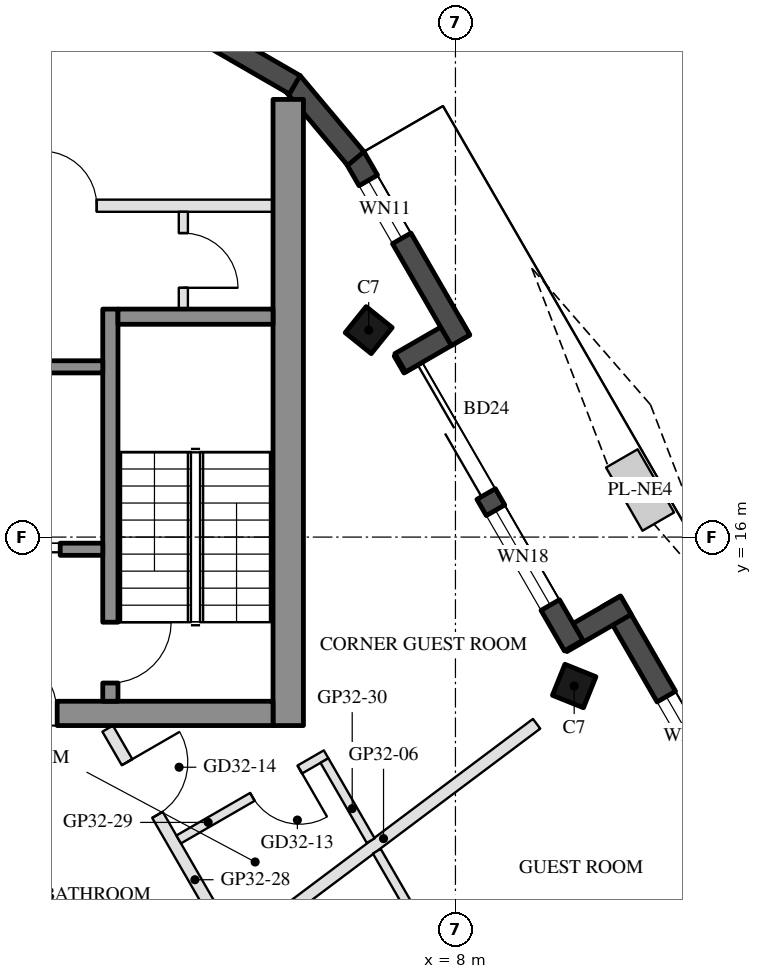
"""IFC4 building model, lengths in metres.
Left out: names, types, materials, properties, quantities, classifications, styles, units other than length and angle.
Written with IfcOpenShell. Run it as: python <this file> out.ifc"""

import sys

from ifc_helpers import new_model, si_unit, direction, frame, frame_2d, origin, origin_2d, place, context, subcontext, project, spatial, rectangle, hollow_rectangle, extrude, boolean, halfspace, element, fill, save


model = new_model("IFC4")
c1 = context("Model", 3, precision=1e-05, world=origin(), true_north=direction((0.0, 1.0)))
c2 = subcontext(c1, "Body", "Model", "MODEL_VIEW")
j1 = project(units=[si_unit("LENGTHUNIT", "METRE"), si_unit("PLANEANGLEUNIT", "RADIAN")], contexts=[c1])
p1 = place(None, origin())
s1 = spatial("IfcSite", under=j1, at=p1, CompositionType="ELEMENT")
p2 = place(p1, origin())
s2 = spatial("IfcBuilding", under=s1, at=p2, CompositionType="ELEMENT")
p3 = place(p2, frame((0.0, 0.0, 309.6)))
s3 = spatial("IfcBuildingStorey", under=s2, at=p3, CompositionType="ELEMENT", Elevation=309.6)
p4 = place(p3, frame((9.953, 13.551, 0.0), z_axis=(-0.100518860507, -0.128252691192, 0.98663428173), x_axis=(-0.503004973265, 0.862140661686, 0.060823320673)))
e1 = element("IfcColumn", 1, at=p4, inside=s3, PredefinedType="COLUMN", context=c2, shape_type="SweptSolid", body=[
    boolean("DIFFERENCE", boolean("DIFFERENCE", extrude(hollow_rectangle(XDim=0.55, YDim=0.55, WallThickness=0.025, at=origin_2d()), origin(), (0.0, 0.0, 1.0), 3.75), halfspace(frame((0.0, 0.0, 0.034), z_axis=(0.0, 0.0, 1.0), x_axis=(1.0, 0.0, 0.0)), True)), halfspace(frame((0.0, 0.0, 3.716), z_axis=(0.0, 0.0, 1.0), x_axis=(1.0, 0.0, 0.0)), False)),
])
p5 = place(p3, frame((6.573, 19.404, 0.0), z_axis=(-0.069728397733, -0.180050765176, 0.981182792608), x_axis=(-0.504276986778, 0.855013934028, 0.12106152661)))
e2 = element("IfcColumn", 2, at=p5, inside=s3, PredefinedType="COLUMN", context=c2, shape_type="SweptSolid", body=[
    boolean("DIFFERENCE", boolean("DIFFERENCE", extrude(hollow_rectangle(XDim=0.55, YDim=0.55, WallThickness=0.025, at=origin_2d()), origin(), (0.0, 0.0, 1.0), 3.771), halfspace(frame((0.0, 0.0, 0.04), z_axis=(0.0, 0.0, 1.0), x_axis=(1.0, 0.0, 0.0)), True)), halfspace(frame((0.0, 0.0, 3.731), z_axis=(0.0, 0.0, 1.0), x_axis=(1.0, 0.0, 0.0)), False)),
])
p6 = place(p3, frame((14.843, 7.531, 0.0), z_axis=(0.0, 0.0, 1.0), x_axis=(-0.500013816581, 0.866017426631, 0.0)))
e3 = element("IfcWall", 3, at=p6, inside=s3, PredefinedType="SOLIDWALL", context=c2, shape_type="SweptSolid", body=[
    extrude(rectangle(XDim=8.559, YDim=0.35, at=frame_2d((4.279, 0.0))), origin(), (0.0, 0.0, 1.0), 3.55),
])
p7 = place(p6, frame((3.15, 0.0, 0.0)))
e4 = element("IfcOpeningElement", 4, at=p7, cuts=e3, PredefinedType="OPENING", context=c2, shape_type="SweptSolid", body=[
    extrude(rectangle(XDim=1.8, YDim=2.4, at=frame_2d((0.9, 1.2))), frame((0.0, 0.185, 0.0), z_axis=(0.0, -1.0, 0.0), x_axis=(1.0, 0.0, 0.0)), (0.0, 0.0, 1.0), 0.37),
])
p8 = place(p6, frame((5.25, 0.0, 0.3)))
e5 = element("IfcOpeningElement", 5, at=p8, cuts=e3, PredefinedType="OPENING", context=c2, shape_type="SweptSolid", body=[
    extrude(rectangle(XDim=1.5, YDim=2.65, at=frame_2d((0.75, 1.325))), frame((0.0, 0.185, 0.0), z_axis=(0.0, -1.0, 0.0), x_axis=(1.0, 0.0, 0.0)), (0.0, 0.0, 1.0), 0.37),
])
p9 = place(p3, frame((10.802, 14.879, 0.0), z_axis=(0.0, 0.0, 1.0), x_axis=(-0.866005645448, -0.500034220881, 0.0)))
e6 = element("IfcWall", 6, at=p9, inside=s3, PredefinedType="SOLIDWALL", context=c2, shape_type="SweptSolid", body=[
    extrude(rectangle(XDim=1.22, YDim=0.35, at=frame_2d((0.61, 0.0))), origin(), (0.0, 0.0, 1.0), 3.55),
])
p10 = place(p3, frame((9.944, 14.216, 0.0), z_axis=(0.0, 0.0, 1.0), x_axis=(-0.500026936782, 0.866009851268, 0.0)))
e7 = element("IfcWall", 7, at=p10, inside=s3, PredefinedType="SOLIDWALL", context=c2, shape_type="SweptSolid", body=[
    extrude(rectangle(XDim=5.599, YDim=0.35, at=frame_2d((2.799, 0.0))), origin(), (0.0, 0.0, 1.0), 3.55),
])
p11 = place(p10, frame((2.879, 0.0, 0.0)))
e8 = element("IfcOpeningElement", 8, at=p11, cuts=e7, PredefinedType="OPENING", context=c2, shape_type="SweptSolid", body=[
    extrude(rectangle(XDim=2.4, YDim=2.4, at=frame_2d((1.2, 1.2))), frame((0.0, 0.185, 0.0), z_axis=(0.0, -1.0, 0.0), x_axis=(1.0, 0.0, 0.0)), (0.0, 0.0, 1.0), 0.37),
])
p12 = place(p10, frame((0.77, 0.0, 0.3)))
e9 = element("IfcOpeningElement", 9, at=p12, cuts=e7, PredefinedType="OPENING", context=c2, shape_type="SweptSolid", body=[
    extrude(rectangle(XDim=1.8, YDim=2.65, at=frame_2d((0.9, 1.325))), frame((0.0, 0.185, 0.0), z_axis=(0.0, -1.0, 0.0), x_axis=(1.0, 0.0, 0.0)), (0.0, 0.0, 1.0), 0.37),
])
p13 = place(p3, frame((7.092, 18.866, 0.0), z_axis=(0.0, 0.0, 1.0), x_axis=(0.866005645448, 0.500034220881, 0.0)))
e10 = element("IfcWall", 10, at=p13, inside=s3, PredefinedType="SOLIDWALL", context=c2, shape_type="SweptSolid", body=[
    extrude(rectangle(XDim=1.22, YDim=0.35, at=frame_2d((0.61, 0.0))), origin(), (0.0, 0.0, 1.0), 3.55),
])
p14 = place(p3, frame((8.084, 19.237, 0.0), z_axis=(0.0, 0.0, 1.0), x_axis=(-0.499949154193, 0.866054757635, 0.0)))
e11 = element("IfcWall", 11, at=p14, inside=s3, PredefinedType="SOLIDWALL", context=c2, shape_type="SweptSolid", body=[
    extrude(rectangle(XDim=3.48, YDim=0.35, at=frame_2d((1.74, 0.0))), origin(), (0.0, 0.0, 1.0), 3.55),
])
p15 = place(p14, frame((1.935, 0.0, 0.3)))
e12 = element("IfcOpeningElement", 12, at=p15, cuts=e11, PredefinedType="OPENING", context=c2, shape_type="SweptSolid", body=[
    extrude(rectangle(XDim=1.1, YDim=2.65, at=frame_2d((0.55, 1.325))), frame((0.0, 0.185, 0.0), z_axis=(0.0, -1.0, 0.0), x_axis=(1.0, 0.0, 0.0)), (0.0, 0.0, 1.0), 0.37),
])
p16 = place(p3, frame((6.361, 22.226, 0.0), z_axis=(0.0, 0.0, 1.0), x_axis=(-0.642782014883, 0.766049137682, 0.0)))
e13 = element("IfcWall", 13, at=p16, inside=s3, PredefinedType="SOLIDWALL", context=c2, shape_type="SweptSolid", body=[
    extrude(rectangle(XDim=1.634, YDim=0.35, at=frame_2d((0.817, 0.0))), origin(), (0.0, 0.0, 1.0), 3.55),
])
p17 = place(p3, frame((5.358, 23.439, 0.0), z_axis=(0.0, 0.0, 1.0), x_axis=(-0.866018903231, 0.500011259119, 0.0)))
e14 = element("IfcWall", 14, at=p17, inside=s3, PredefinedType="SOLIDWALL", context=c2, shape_type="SweptSolid", body=[
    extrude(rectangle(XDim=1.634, YDim=0.35, at=frame_2d((0.817, 0.0))), origin(), (0.0, 0.0, 1.0), 3.55),
])
p18 = place(p3, frame((5.25, 12.9, 0.0), z_axis=(0.0, 0.0, 1.0), x_axis=(0.0, 1.0, 0.0)))
e15 = element("IfcWall", 15, at=p18, inside=s3, PredefinedType="SHEAR", context=c2, shape_type="SweptSolid", body=[
    extrude(rectangle(XDim=10.299, YDim=0.5, at=frame_2d((5.149, 0.0))), origin(), (0.0, 0.0, 1.0), 3.5),
])
p19 = place(p3, frame((5.0, 13.1, 0.0), z_axis=(0.0, 0.0, 1.0), x_axis=(-1.0, 0.0, 0.0)))
e16 = element("IfcWall", 16, at=p19, inside=s3, PredefinedType="SHEAR", context=c2, shape_type="SweptSolid", body=[
    extrude(rectangle(XDim=10.0, YDim=0.4, at=frame_2d((5.0, 0.0))), origin(), (0.0, 0.0, 1.0), 3.5),
])
p20 = place(p19, frame((3.55, 0.0, 0.0)))
e17 = element("IfcOpeningElement", 17, at=p20, cuts=e16, PredefinedType="OPENING", context=c2, shape_type="SweptSolid", body=[
    extrude(rectangle(XDim=1.1, YDim=2.1, at=frame_2d((0.55, 1.05))), frame((0.0, 0.21, 0.0), z_axis=(0.0, -1.0, 0.0), x_axis=(1.0, 0.0, 0.0)), (0.0, 0.0, 1.0), 0.42),
])
p21 = place(p19, frame((5.85, 0.0, 0.0)))
e18 = element("IfcOpeningElement", 18, at=p21, cuts=e16, PredefinedType="OPENING", context=c2, shape_type="SweptSolid", body=[
    extrude(rectangle(XDim=1.4, YDim=2.1, at=frame_2d((0.7, 1.05))), frame((0.0, 0.21, 0.0), z_axis=(0.0, -1.0, 0.0), x_axis=(1.0, 0.0, 0.0)), (0.0, 0.0, 1.0), 0.42),
])
p22 = place(p3, frame((2.325, 13.3, 0.0), z_axis=(0.0, 0.0, 1.0), x_axis=(0.0, 1.0, 0.0)))
e19 = element("IfcWall", 19, at=p22, inside=s3, PredefinedType="SHEAR", context=c2, shape_type="SweptSolid", body=[
    extrude(rectangle(XDim=6.45, YDim=0.25, at=frame_2d((3.225, 0.0))), origin(), (0.0, 0.0, 1.0), 3.5),
])
p23 = place(p22, frame((0.3, 0.0, 0.0)))
e20 = element("IfcOpeningElement", 20, at=p23, cuts=e19, PredefinedType="OPENING", context=c2, shape_type="SweptSolid", body=[
    extrude(rectangle(XDim=1.0, YDim=2.1, at=frame_2d((0.5, 1.05))), frame((0.0, 0.135, 0.0), z_axis=(0.0, -1.0, 0.0), x_axis=(1.0, 0.0, 0.0)), (0.0, 0.0, 1.0), 0.27),
])
p24 = place(p3, frame((5.0, 19.625, 0.0), z_axis=(0.0, 0.0, 1.0), x_axis=(-1.0, 0.0, 0.0)))
e21 = element("IfcWall", 21, at=p24, inside=s3, PredefinedType="SHEAR", context=c2, shape_type="SweptSolid", body=[
    extrude(rectangle(XDim=2.55, YDim=0.25, at=frame_2d((1.275, 0.0))), origin(), (0.0, 0.0, 1.0), 3.5),
])
p25 = place(p3, frame((2.2, 18.8, 0.0), z_axis=(0.0, 0.0, 1.0), x_axis=(-1.0, 0.0, 0.0)))
e22 = element("IfcWall", 22, at=p25, inside=s3, PredefinedType="SHEAR", context=c2, shape_type="SweptSolid", body=[
    extrude(rectangle(XDim=2.8, YDim=0.2, at=frame_2d((1.4, 0.0))), origin(), (0.0, 0.0, 1.0), 3.5),
])
p26 = place(p3, frame((2.2, 15.8, 0.0), z_axis=(0.0, 0.0, 1.0), x_axis=(-1.0, 0.0, 0.0)))
e23 = element("IfcWall", 23, at=p26, inside=s3, PredefinedType="SHEAR", context=c2, shape_type="SweptSolid", body=[
    extrude(rectangle(XDim=2.8, YDim=0.2, at=frame_2d((1.4, 0.0))), origin(), (0.0, 0.0, 1.0), 3.5),
])
p27 = place(p26, frame((0.7, 0.0, 0.0)))
e24 = element("IfcOpeningElement", 24, at=p27, cuts=e23, PredefinedType="OPENING", context=c2, shape_type="SweptSolid", body=[
    extrude(rectangle(XDim=1.2, YDim=2.1, at=frame_2d((0.6, 1.05))), frame((0.0, 0.11, 0.0), z_axis=(0.0, -1.0, 0.0), x_axis=(1.0, 0.0, 0.0)), (0.0, 0.0, 1.0), 0.22),
])
p28 = place(p3, frame((5.0, 21.45, 0.0), z_axis=(0.0, 0.0, 1.0), x_axis=(-1.0, 0.0, 0.0)))
e25 = element("IfcWall", 25, at=p28, inside=s3, PredefinedType="PARTITIONING", context=c2, shape_type="SweptSolid", body=[
    extrude(rectangle(XDim=5.4, YDim=0.2, at=frame_2d((2.7, 0.0))), origin(), (0.0, 0.0, 1.0), 3.5),
])
p29 = place(p28, frame((2.9, 0.0, 0.0)))
e26 = element("IfcOpeningElement", 26, at=p29, cuts=e25, PredefinedType="OPENING", context=c2, shape_type="SweptSolid", body=[
    extrude(rectangle(XDim=0.9, YDim=2.1, at=frame_2d((0.45, 1.05))), frame((0.0, 0.11, 0.0), z_axis=(0.0, -1.0, 0.0), x_axis=(1.0, 0.0, 0.0)), (0.0, 0.0, 1.0), 0.22),
])
p30 = place(p3, frame((3.525, 19.75, 0.0), z_axis=(0.0, 0.0, 1.0), x_axis=(0.0, 1.0, 0.0)))
e27 = element("IfcWall", 27, at=p30, inside=s3, PredefinedType="PARTITIONING", context=c2, shape_type="SweptSolid", body=[
    extrude(rectangle(XDim=1.6, YDim=0.15, at=frame_2d((0.8, 0.0))), origin(), (0.0, 0.0, 1.0), 3.5),
])
p31 = place(p30, frame((0.35, 0.0, 0.0)))
e28 = element("IfcOpeningElement", 28, at=p31, cuts=e27, PredefinedType="OPENING", context=c2, shape_type="SweptSolid", body=[
    extrude(rectangle(XDim=0.9, YDim=2.1, at=frame_2d((0.45, 1.05))), frame((0.0, 0.085, 0.0), z_axis=(0.0, -1.0, 0.0), x_axis=(1.0, 0.0, 0.0)), (0.0, 0.0, 1.0), 0.17),
])
p32 = place(p3, frame((9.334, 12.93, 0.0), z_axis=(0.0, 0.0, 1.0), x_axis=(-0.799864994536, -0.600179965107, 0.0)))
e29 = element("IfcWall", 29, at=p32, inside=s3, PredefinedType="PARTITIONING", context=c2, shape_type="SweptSolid", body=[
    extrude(rectangle(XDim=6.294, YDim=0.2, at=frame_2d((3.147, 0.0))), origin(), (0.0, 0.0, 1.0), 3.1),
])
p33 = place(p3, frame((7.79, 8.957, 0.0), z_axis=(0.0, 0.0, 1.0), x_axis=(-0.500018419339, 0.866014769113, 0.0)))
e30 = element("IfcWall", 30, at=p33, inside=s3, PredefinedType="PARTITIONING", context=c2, shape_type="SweptSolid", body=[
    extrude(rectangle(XDim=2.166, YDim=0.15, at=frame_2d((1.083, 0.0))), origin(), (0.0, 0.0, 1.0), 3.55),
])
p34 = place(p3, frame((2.281, 12.85, 0.0), z_axis=(0.0, 0.0, 1.0), x_axis=(0.500007699544, -0.866020958405, 0.0)))
e31 = element("IfcWall", 31, at=p34, inside=s3, PredefinedType="PARTITIONING", context=c2, shape_type="SweptSolid", body=[
    extrude(rectangle(XDim=4.1, YDim=0.2, at=frame_2d((2.05, 0.0))), origin(), (0.0, 0.0, 1.0), 3.1),
])
p35 = place(p34, frame((0.637, 0.0, 0.0)))
e32 = element("IfcOpeningElement", 32, at=p35, cuts=e31, PredefinedType="OPENING", context=c2, shape_type="SweptSolid", body=[
    extrude(rectangle(XDim=1.0, YDim=2.1, at=frame_2d((0.5, 1.05))), frame((0.0, 0.11, 0.0), z_axis=(0.0, -1.0, 0.0), x_axis=(1.0, 0.0, 0.0)), (0.0, 0.0, 1.0), 0.22),
])
p36 = place(p3, frame((5.873, 12.427, 0.0), z_axis=(0.0, 0.0, 1.0), x_axis=(-0.866034573852, -0.49998411664, 0.0)))
e33 = element("IfcWall", 33, at=p36, inside=s3, PredefinedType="PARTITIONING", context=c2, shape_type="SweptSolid", body=[
    extrude(rectangle(XDim=2.8, YDim=0.15, at=frame_2d((1.4, 0.0))), origin(), (0.0, 0.0, 1.0), 3.55),
])
p37 = place(p36, frame((0.5, 0.0, 0.0)))
e34 = element("IfcOpeningElement", 34, at=p37, cuts=e33, PredefinedType="OPENING", context=c2, shape_type="SweptSolid", body=[
    extrude(rectangle(XDim=0.9, YDim=2.1, at=frame_2d((0.45, 1.05))), frame((0.0, 0.085, 0.0), z_axis=(0.0, -1.0, 0.0), x_axis=(1.0, 0.0, 0.0)), (0.0, 0.0, 1.0), 0.17),
])
p38 = place(p3, frame((6.606, 11.008, 0.0), z_axis=(0.0, 0.0, 1.0), x_axis=(-0.500023511883, 0.866011828767, 0.0)))
e35 = element("IfcWall", 35, at=p38, inside=s3, PredefinedType="PARTITIONING", context=c2, shape_type="SweptSolid", body=[
    extrude(rectangle(XDim=1.521, YDim=0.15, at=frame_2d((0.76, 0.0))), origin(), (0.0, 0.0, 1.0), 3.1),
])
p39 = place(p8, origin())
e36 = element("IfcWindow", 36, at=p39, inside=s3, PartitioningType="SINGLE_PANEL", PredefinedType="WINDOW", context=c2, shape_type="SweptSolid", body=[
    extrude(rectangle(XDim=1.5, YDim=2.65, at=frame_2d((0.75, 1.325))), frame((0.0, 0.03, 0.0), z_axis=(0.0, -1.0, 0.0), x_axis=(1.0, 0.0, 0.0)), (0.0, 0.0, 1.0), 0.06),
])
fill(e5, e36)
p40 = place(p11, frame((2.4, 0.0, 0.0), z_axis=(0.0, 0.0, 1.0), x_axis=(-1.0, 0.0, 0.0)))
e37 = element("IfcDoor", 37, at=p40, inside=s3, OperationType="SLIDING_TO_LEFT", PredefinedType="DOOR", context=c2, shape_type="SweptSolid", body=[
    extrude(rectangle(XDim=2.4, YDim=2.4, at=frame_2d((1.2, 1.2))), frame((0.0, 0.025, 0.0), z_axis=(0.0, -1.0, 0.0), x_axis=(1.0, 0.0, 0.0)), (0.0, 0.0, 1.0), 0.05),
])
fill(e8, e37)
p41 = place(p12, origin())
e38 = element("IfcWindow", 38, at=p41, inside=s3, PartitioningType="SINGLE_PANEL", PredefinedType="WINDOW", context=c2, shape_type="SweptSolid", body=[
    extrude(rectangle(XDim=1.8, YDim=2.65, at=frame_2d((0.9, 1.325))), frame((0.0, 0.03, 0.0), z_axis=(0.0, -1.0, 0.0), x_axis=(1.0, 0.0, 0.0)), (0.0, 0.0, 1.0), 0.06),
])
fill(e9, e38)
p42 = place(p15, origin())
e39 = element("IfcWindow", 39, at=p42, inside=s3, PartitioningType="SINGLE_PANEL", PredefinedType="WINDOW", context=c2, shape_type="SweptSolid", body=[
    extrude(rectangle(XDim=1.1, YDim=2.65, at=frame_2d((0.55, 1.325))), frame((0.0, 0.03, 0.0), z_axis=(0.0, -1.0, 0.0), x_axis=(1.0, 0.0, 0.0)), (0.0, 0.0, 1.0), 0.06),
])
fill(e12, e39)
p43 = place(p27, origin())
e40 = element("IfcDoor", 40, at=p43, inside=s3, OperationType="DOUBLE_DOOR_SLIDING", PredefinedType="DOOR", context=c2, shape_type="SweptSolid", body=[
    extrude(rectangle(XDim=1.2, YDim=2.1, at=frame_2d((0.6, 1.05))), frame((0.0, 0.025, 0.0), z_axis=(0.0, -1.0, 0.0), x_axis=(1.0, 0.0, 0.0)), (0.0, 0.0, 1.0), 0.05),
])
fill(e24, e40)
p44 = place(p31, frame((0.9, 0.0, 0.0), z_axis=(0.0, 0.0, 1.0), x_axis=(-1.0, 0.0, 0.0)))
e41 = element("IfcDoor", 41, at=p44, inside=s3, OperationType="SINGLE_SWING_RIGHT", PredefinedType="DOOR", context=c2, shape_type="SweptSolid", body=[
    extrude(rectangle(XDim=0.9, YDim=2.1, at=frame_2d((0.45, 1.05))), frame((0.0, 0.025, 0.0), z_axis=(0.0, -1.0, 0.0), x_axis=(1.0, 0.0, 0.0)), (0.0, 0.0, 1.0), 0.05),
])
fill(e28, e41)
p45 = place(p29, frame((0.9, 0.0, 0.0), z_axis=(0.0, 0.0, 1.0), x_axis=(-1.0, 0.0, 0.0)))
e42 = element("IfcDoor", 42, at=p45, inside=s3, OperationType="SINGLE_SWING_LEFT", PredefinedType="DOOR", context=c2, shape_type="SweptSolid", body=[
    extrude(rectangle(XDim=0.9, YDim=2.1, at=frame_2d((0.45, 1.05))), frame((0.0, 0.025, 0.0), z_axis=(0.0, -1.0, 0.0), x_axis=(1.0, 0.0, 0.0)), (0.0, 0.0, 1.0), 0.05),
])
fill(e26, e42)
p46 = place(p20, frame((1.1, 0.0, 0.0), z_axis=(0.0, 0.0, 1.0), x_axis=(-1.0, 0.0, 0.0)))
e43 = element("IfcDoor", 43, at=p46, inside=s3, OperationType="SINGLE_SWING_LEFT", PredefinedType="DOOR", context=c2, shape_type="SweptSolid", body=[
    extrude(rectangle(XDim=1.1, YDim=2.1, at=frame_2d((0.55, 1.05))), frame((0.0, 0.025, 0.0), z_axis=(0.0, -1.0, 0.0), x_axis=(1.0, 0.0, 0.0)), (0.0, 0.0, 1.0), 0.05),
])
fill(e17, e43)
p47 = place(p23, frame((1.0, 0.0, 0.0), z_axis=(0.0, 0.0, 1.0), x_axis=(-1.0, 0.0, 0.0)))
e44 = element("IfcDoor", 44, at=p47, inside=s3, OperationType="SINGLE_SWING_LEFT", PredefinedType="DOOR", context=c2, shape_type="SweptSolid", body=[
    extrude(rectangle(XDim=1.0, YDim=2.1, at=frame_2d((0.5, 1.05))), frame((0.0, 0.025, 0.0), z_axis=(0.0, -1.0, 0.0), x_axis=(1.0, 0.0, 0.0)), (0.0, 0.0, 1.0), 0.05),
])
fill(e20, e44)
p48 = place(p37, origin())
e45 = element("IfcDoor", 45, at=p48, inside=s3, OperationType="SINGLE_SWING_LEFT", PredefinedType="DOOR", context=c2, shape_type="SweptSolid", body=[
    extrude(rectangle(XDim=0.9, YDim=2.1, at=frame_2d((0.45, 1.05))), frame((0.0, 0.025, 0.0), z_axis=(0.0, -1.0, 0.0), x_axis=(1.0, 0.0, 0.0)), (0.0, 0.0, 1.0), 0.05),
])
fill(e34, e45)
p49 = place(p35, origin())
e46 = element("IfcDoor", 46, at=p49, inside=s3, OperationType="SINGLE_SWING_LEFT", PredefinedType="DOOR", context=c2, shape_type="SweptSolid", body=[
    extrude(rectangle(XDim=1.0, YDim=2.1, at=frame_2d((0.5, 1.05))), frame((0.0, 0.025, 0.0), z_axis=(0.0, -1.0, 0.0), x_axis=(1.0, 0.0, 0.0)), (0.0, 0.0, 1.0), 0.05),
])
fill(e32, e46)
save(model, sys.argv[1])
